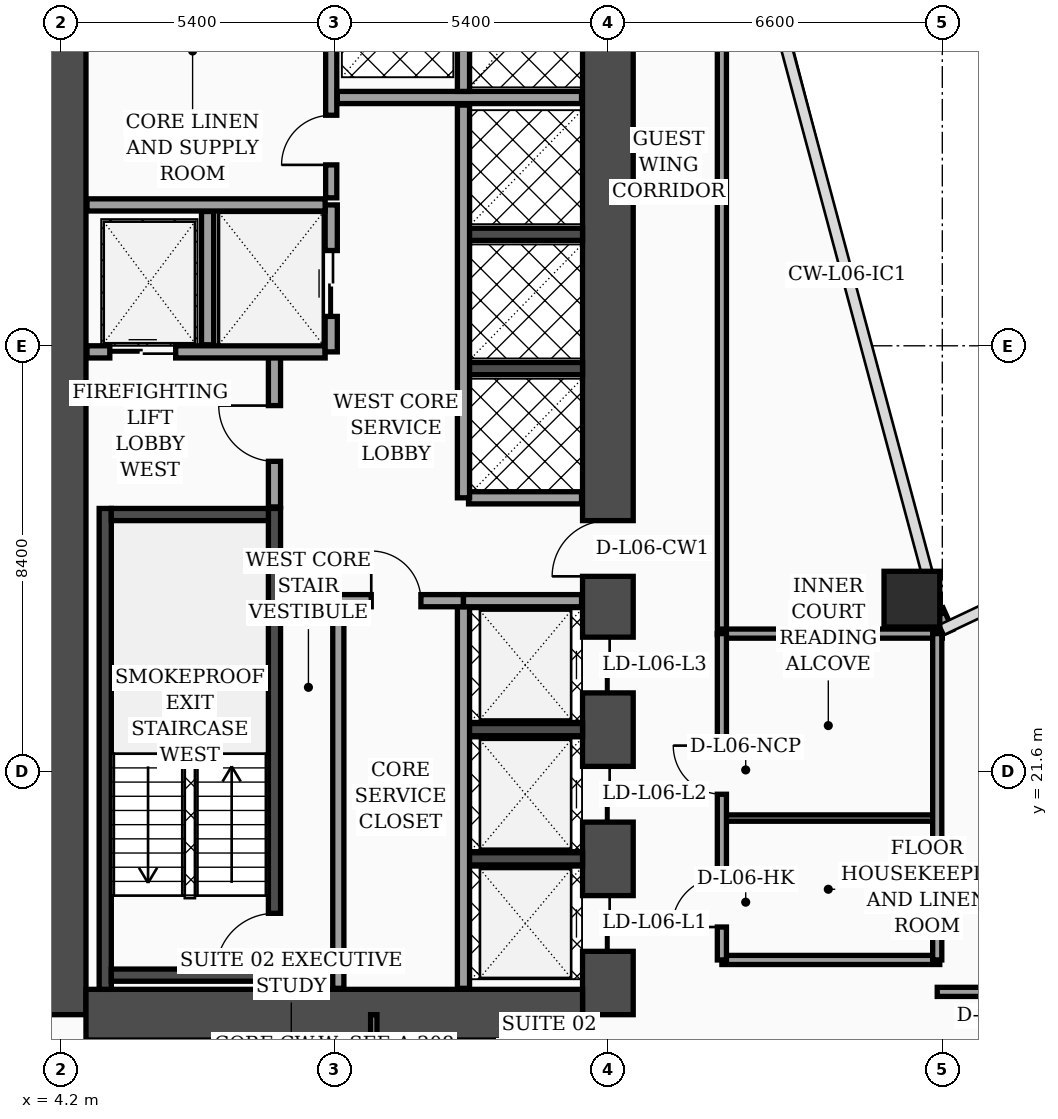
"""IFC4 building model, lengths in metres.
Left out: names, types, materials, properties, quantities, classifications, styles, units other than length and angle.
Written with IfcOpenShell. Run it as: python <this file> out.ifc"""

import sys

from ifc_helpers import new_model, si_unit, direction, frame, frame_2d, origin, origin_2d, place, context, subcontext, project, spatial, rectangle, hollow_rectangle, extrude, element, fill, save


model = new_model("IFC4")
c1 = context("Model", 3, precision=1e-05, world=origin(), true_north=direction((0.0, 1.0)))
c2 = subcontext(c1, "Body", "Model", "MODEL_VIEW")
j1 = project(units=[si_unit("LENGTHUNIT", "METRE"), si_unit("PLANEANGLEUNIT", "RADIAN")], contexts=[c1])
p1 = place(None, origin())
s1 = spatial("IfcSite", under=j1, at=p1, CompositionType="ELEMENT")
p2 = place(p1, origin())
s2 = spatial("IfcBuilding", under=s1, at=p2, CompositionType="ELEMENT")
p3 = place(p2, frame((0.0, 0.0, 30.8)))
s3 = spatial("IfcBuildingStorey", under=s2, at=p3, CompositionType="ELEMENT", Elevation=30.8)
p4 = place(p3, frame((4.2, 16.8, 0.0), z_axis=(0.0, 0.0, 1.0), x_axis=(0.0, 1.0, 0.0)))
e1 = element("IfcWall", 1, at=p4, inside=s3, PredefinedType="SHEAR", context=c2, shape_type="SweptSolid", body=[
    extrude(rectangle(XDim=21.6, YDim=1.0, at=frame_2d((10.8, 0.0))), origin(), (0.0, 0.0, 1.0), 3.56),
])
p5 = place(p3, frame((15.0, 16.8, 0.0), z_axis=(0.0, 0.0, 1.0), x_axis=(0.0, 1.0, 0.0)))
e2 = element("IfcWall", 2, at=p5, inside=s3, PredefinedType="SHEAR", context=c2, shape_type="SweptSolid", body=[
    extrude(rectangle(XDim=21.6, YDim=1.0, at=frame_2d((10.8, 0.0))), origin(), (0.0, 0.0, 1.0), 3.56),
])
p6 = place(p5, frame((8.65, 0.0, 0.0)))
e3 = element("IfcOpeningElement", 3, at=p6, cuts=e2, PredefinedType="OPENING", context=c2, shape_type="SweptSolid", body=[
    extrude(rectangle(XDim=1.1, YDim=2.2, at=frame_2d((0.55, 1.1))), frame((0.0, 0.51, 0.0), z_axis=(0.0, -1.0, 0.0), x_axis=(1.0, 0.0, 0.0)), (0.0, 0.0, 1.0), 1.02),
])
p7 = place(p5, frame((1.25, 0.0, 0.0)))
e4 = element("IfcOpeningElement", 4, at=p7, cuts=e2, PredefinedType="OPENING", context=c2, shape_type="SweptSolid", body=[
    extrude(rectangle(XDim=1.1, YDim=2.2, at=frame_2d((0.55, 1.1))), frame((0.0, 0.51, 0.0), z_axis=(0.0, -1.0, 0.0), x_axis=(1.0, 0.0, 0.0)), (0.0, 0.0, 1.0), 1.02),
])
p8 = place(p5, frame((3.8, 0.0, 0.0)))
e5 = element("IfcOpeningElement", 5, at=p8, cuts=e2, PredefinedType="OPENING", context=c2, shape_type="SweptSolid", body=[
    extrude(rectangle(XDim=1.1, YDim=2.2, at=frame_2d((0.55, 1.1))), frame((0.0, 0.51, 0.0), z_axis=(0.0, -1.0, 0.0), x_axis=(1.0, 0.0, 0.0)), (0.0, 0.0, 1.0), 1.02),
])
p9 = place(p5, frame((6.35, 0.0, 0.0)))
e6 = element("IfcOpeningElement", 6, at=p9, cuts=e2, PredefinedType="OPENING", context=c2, shape_type="SweptSolid", body=[
    extrude(rectangle(XDim=1.1, YDim=2.2, at=frame_2d((0.55, 1.1))), frame((0.0, 0.51, 0.0), z_axis=(0.0, -1.0, 0.0), x_axis=(1.0, 0.0, 0.0)), (0.0, 0.0, 1.0), 1.02),
])
p10 = place(p3, frame((4.7, 16.8, 0.0), z_axis=(0.0, 0.0, 1.0), x_axis=(1.0, 0.0, 0.0)))
e7 = element("IfcWall", 7, at=p10, inside=s3, PredefinedType="SHEAR", context=c2, shape_type="SweptSolid", body=[
    extrude(rectangle(XDim=9.8, YDim=1.0, at=frame_2d((4.9, 0.0))), origin(), (0.0, 0.0, 1.0), 3.56),
])
p11 = place(p3, frame((5.08, 17.3, 0.0), z_axis=(0.0, 0.0, 1.0), x_axis=(0.0, 1.0, 0.0)))
e8 = element("IfcWall", 8, at=p11, inside=s3, PredefinedType="SOLIDWALL", context=c2, shape_type="SweptSolid", body=[
    extrude(rectangle(XDim=9.49, YDim=0.24, at=frame_2d((4.745, 0.0))), origin(), (0.0, 0.0, 1.0), 3.56),
])
p12 = place(p3, frame((8.42, 17.3, 0.0), z_axis=(0.0, 0.0, 1.0), x_axis=(0.0, 1.0, 0.0)))
e9 = element("IfcWall", 9, at=p12, inside=s3, PredefinedType="SOLIDWALL", context=c2, shape_type="SweptSolid", body=[
    extrude(rectangle(XDim=9.49, YDim=0.24, at=frame_2d((4.745, 0.0))), origin(), (0.0, 0.0, 1.0), 3.56),
])
p13 = place(p12, frame((0.35, 0.0, 0.0)))
e10 = element("IfcOpeningElement", 10, at=p13, cuts=e9, PredefinedType="OPENING", context=c2, shape_type="SweptSolid", body=[
    extrude(rectangle(XDim=1.15, YDim=2.2, at=frame_2d((0.575, 1.1))), frame((0.0, 0.13, 0.0), z_axis=(0.0, -1.0, 0.0), x_axis=(1.0, 0.0, 0.0)), (0.0, 0.0, 1.0), 0.26),
])
for number, where, z_axis, x_axis in (
    (11, (5.2, 17.58, 0.0), (0.0, 0.0, 1.0), (1.0, 0.0, 0.0)),
    (12, (5.2, 26.67, 0.0), (0.0, 0.0, 1.0), (1.0, 0.0, 0.0)),
):
    element("IfcWall", number, at=place(p3, frame(where, z_axis=z_axis, x_axis=x_axis)), inside=s3, PredefinedType="SOLIDWALL", context=c2, shape_type="SweptSolid", body=[
        extrude(rectangle(XDim=3.1, YDim=0.24, at=frame_2d((1.55, 0.0))), origin(), (0.0, 0.0, 1.0), 3.56),
    ])
for number, where, z_axis, x_axis in (
    (13, (12.18, 19.875, 0.0), (0.0, 0.0, 1.0), (1.0, 0.0, 0.0)),
    (14, (12.18, 22.425, 0.0), (0.0, 0.0, 1.0), (1.0, 0.0, 0.0)),
    (15, (12.18, 29.55, 0.0), (0.0, 0.0, 1.0), (1.0, 0.0, 0.0)),
    (16, (12.18, 32.2, 0.0), (0.0, 0.0, 1.0), (1.0, 0.0, 0.0)),
):
    element("IfcWall", number, at=place(p3, frame(where, z_axis=z_axis, x_axis=x_axis)), inside=s3, PredefinedType="SOLIDWALL", context=c2, shape_type="SweptSolid", body=[
        extrude(rectangle(XDim=2.32, YDim=0.24, at=frame_2d((1.16, 0.0))), origin(), (0.0, 0.0, 1.0), 3.56),
    ])
p14 = place(p3, frame((21.0, 25.0, 0.0), z_axis=(0.0, 0.0, 1.0), x_axis=(1.0, 0.0, 0.0)))
e17 = element("IfcColumn", 17, at=p14, inside=s3, PredefinedType="COLUMN", context=c2, shape_type="SweptSolid", body=[
    extrude(hollow_rectangle(XDim=1.1, YDim=1.1, WallThickness=0.045, at=origin_2d()), origin(), (0.0, 0.0, 1.0), 3.56),
])
p15 = place(p3, frame((21.68, 24.34, 0.0), z_axis=(0.0, 0.0, 1.0), x_axis=(-0.40758134973, 0.913168901875, 0.0)))
e18 = element("IfcWall", 18, at=p15, inside=s3, PredefinedType="SOLIDWALL", context=c2, shape_type="SweptSolid", body=[
    extrude(rectangle(XDim=0.471, YDim=0.28, at=frame_2d((0.235, 0.0))), origin(), (0.0, 0.0, 1.0), 3.56),
])
p16 = place(p3, frame((8.42, 26.82, 0.0), z_axis=(0.0, 0.0, 1.0), x_axis=(0.0, 1.0, 0.0)))
e19 = element("IfcWall", 19, at=p16, inside=s3, PredefinedType="SOLIDWALL", context=c2, shape_type="SweptSolid", body=[
    extrude(rectangle(XDim=3.0, YDim=0.24, at=frame_2d((1.5, 0.0))), origin(), (0.0, 0.0, 1.0), 3.56),
])
p17 = place(p16, frame((0.9, 0.0, 0.0)))
e20 = element("IfcOpeningElement", 20, at=p17, cuts=e19, PredefinedType="OPENING", context=c2, shape_type="SweptSolid", body=[
    extrude(rectangle(XDim=1.1, YDim=2.2, at=frame_2d((0.55, 1.1))), frame((0.0, 0.13, 0.0), z_axis=(0.0, -1.0, 0.0), x_axis=(1.0, 0.0, 0.0)), (0.0, 0.0, 1.0), 0.26),
])
p18 = place(p3, frame((4.72, 29.88, 0.0), z_axis=(0.0, 0.0, 1.0), x_axis=(1.0, 0.0, 0.0)))
e21 = element("IfcWall", 21, at=p18, inside=s3, PredefinedType="SOLIDWALL", context=c2, shape_type="SweptSolid", body=[
    extrude(rectangle(XDim=4.7, YDim=0.24, at=frame_2d((2.35, 0.0))), origin(), (0.0, 0.0, 1.0), 3.56),
])
p19 = place(p18, frame((0.45, 0.0, 0.0)))
e22 = element("IfcOpeningElement", 22, at=p19, cuts=e21, PredefinedType="OPENING", context=c2, shape_type="SweptSolid", body=[
    extrude(rectangle(XDim=1.3, YDim=2.35, at=frame_2d((0.65, 1.175))), frame((0.0, 0.13, 0.0), z_axis=(0.0, -1.0, 0.0), x_axis=(1.0, 0.0, 0.0)), (0.0, 0.0, 1.0), 0.26),
])
p20 = place(p3, frame((7.1, 30.02, 0.0), z_axis=(0.0, 0.0, 1.0), x_axis=(0.0, 1.0, 0.0)))
e23 = element("IfcWall", 23, at=p20, inside=s3, PredefinedType="SOLIDWALL", context=c2, shape_type="SweptSolid", body=[
    extrude(rectangle(XDim=2.63, YDim=0.24, at=frame_2d((1.315, 0.0))), origin(), (0.0, 0.0, 1.0), 3.56),
])
p21 = place(p3, frame((9.54, 29.88, 0.0), z_axis=(0.0, 0.0, 1.0), x_axis=(0.0, 1.0, 0.0)))
e24 = element("IfcWall", 24, at=p21, inside=s3, PredefinedType="SOLIDWALL", context=c2, shape_type="SweptSolid", body=[
    extrude(rectangle(XDim=2.9, YDim=0.24, at=frame_2d((1.45, 0.0))), origin(), (0.0, 0.0, 1.0), 3.56),
])
p22 = place(p21, frame((0.7, 0.0, 0.0)))
e25 = element("IfcOpeningElement", 25, at=p22, cuts=e24, PredefinedType="OPENING", context=c2, shape_type="SweptSolid", body=[
    extrude(rectangle(XDim=1.3, YDim=2.35, at=frame_2d((0.65, 1.175))), frame((0.0, 0.13, 0.0), z_axis=(0.0, -1.0, 0.0), x_axis=(1.0, 0.0, 0.0)), (0.0, 0.0, 1.0), 0.26),
])
p23 = place(p3, frame((4.72, 32.78, 0.0), z_axis=(0.0, 0.0, 1.0), x_axis=(1.0, 0.0, 0.0)))
e26 = element("IfcWall", 26, at=p23, inside=s3, PredefinedType="SOLIDWALL", context=c2, shape_type="SweptSolid", body=[
    extrude(rectangle(XDim=4.7, YDim=0.24, at=frame_2d((2.35, 0.0))), origin(), (0.0, 0.0, 1.0), 3.56),
])
p24 = place(p3, frame((9.68, 17.32, 0.0), z_axis=(0.0, 0.0, 1.0), x_axis=(0.0, 1.0, 0.0)))
e27 = element("IfcWall", 27, at=p24, inside=s3, PredefinedType="SOLIDWALL", context=c2, shape_type="SweptSolid", body=[
    extrude(rectangle(XDim=7.68, YDim=0.22, at=frame_2d((3.84, 0.0))), origin(), (0.0, 0.0, 1.0), 3.56),
])
p25 = place(p3, frame((9.54, 32.92, 0.0), z_axis=(0.0, 0.0, 1.0), x_axis=(0.0, 1.0, 0.0)))
e28 = element("IfcWall", 28, at=p25, inside=s3, PredefinedType="SOLIDWALL", context=c2, shape_type="SweptSolid", body=[
    extrude(rectangle(XDim=4.96, YDim=0.22, at=frame_2d((2.48, 0.0))), origin(), (0.0, 0.0, 1.0), 3.56),
])
p26 = place(p25, frame((0.65, 0.0, 0.0)))
e29 = element("IfcOpeningElement", 29, at=p26, cuts=e28, PredefinedType="OPENING", context=c2, shape_type="SweptSolid", body=[
    extrude(rectangle(XDim=0.98, YDim=2.15, at=frame_2d((0.49, 1.075))), frame((0.0, 0.12, 0.0), z_axis=(0.0, -1.0, 0.0), x_axis=(1.0, 0.0, 0.0)), (0.0, 0.0, 1.0), 0.24),
])
p27 = place(p3, frame((12.15, 17.32, 0.0), z_axis=(0.0, 0.0, 1.0), x_axis=(0.0, 1.0, 0.0)))
e30 = element("IfcWall", 30, at=p27, inside=s3, PredefinedType="SOLIDWALL", context=c2, shape_type="SweptSolid", body=[
    extrude(rectangle(XDim=7.65, YDim=0.24, at=frame_2d((3.825, 0.0))), origin(), (0.0, 0.0, 1.0), 3.56),
])
p28 = place(p3, frame((9.68, 24.97, 0.0), z_axis=(0.0, 0.0, 1.0), x_axis=(1.0, 0.0, 0.0)))
e31 = element("IfcWall", 31, at=p28, inside=s3, PredefinedType="SOLIDWALL", context=c2, shape_type="SweptSolid", body=[
    extrude(rectangle(XDim=2.47, YDim=0.24, at=frame_2d((1.235, 0.0))), origin(), (0.0, 0.0, 1.0), 3.56),
])
p29 = place(p28, frame((0.65, 0.0, 0.0)))
e32 = element("IfcOpeningElement", 32, at=p29, cuts=e31, PredefinedType="OPENING", context=c2, shape_type="SweptSolid", body=[
    extrude(rectangle(XDim=0.98, YDim=2.15, at=frame_2d((0.49, 1.075))), frame((0.0, 0.13, 0.0), z_axis=(0.0, -1.0, 0.0), x_axis=(1.0, 0.0, 0.0)), (0.0, 0.0, 1.0), 0.26),
])
p30 = place(p3, frame((12.15, 24.97, 0.0), z_axis=(0.0, 0.0, 1.0), x_axis=(1.0, 0.0, 0.0)))
e33 = element("IfcWall", 33, at=p30, inside=s3, PredefinedType="SOLIDWALL", context=c2, shape_type="SweptSolid", body=[
    extrude(rectangle(XDim=2.33, YDim=0.24, at=frame_2d((1.165, 0.0))), origin(), (0.0, 0.0, 1.0), 2.84),
])
p31 = place(p3, frame((12.25, 27.0, 0.0), z_axis=(0.0, 0.0, 1.0), x_axis=(1.0, 0.0, 0.0)))
e34 = element("IfcWall", 34, at=p31, inside=s3, PredefinedType="SOLIDWALL", context=c2, shape_type="SweptSolid", body=[
    extrude(rectangle(XDim=2.23, YDim=0.24, at=frame_2d((1.115, 0.0))), origin(), (0.0, 0.0, 1.0), 3.56),
])
p32 = place(p3, frame((12.15, 27.0, 0.0), z_axis=(0.0, 0.0, 1.0), x_axis=(0.0, 1.0, 0.0)))
e35 = element("IfcWall", 35, at=p32, inside=s3, PredefinedType="SOLIDWALL", context=c2, shape_type="SweptSolid", body=[
    extrude(rectangle(XDim=7.75, YDim=0.24, at=frame_2d((3.875, 0.0))), origin(), (0.0, 0.0, 1.0), 3.56),
])
p33 = place(p3, frame((9.66, 34.9, 0.0), z_axis=(0.0, 0.0, 1.0), x_axis=(1.0, 0.0, 0.0)))
e36 = element("IfcWall", 36, at=p33, inside=s3, PredefinedType="SOLIDWALL", context=c2, shape_type="SweptSolid", body=[
    extrude(rectangle(XDim=4.82, YDim=0.24, at=frame_2d((2.41, 0.0))), origin(), (0.0, 0.0, 1.0), 3.56),
])
p34 = place(p3, frame((12.15, 35.02, 0.0), z_axis=(0.0, 0.0, 1.0), x_axis=(0.0, 1.0, 0.0)))
e37 = element("IfcWall", 37, at=p34, inside=s3, PredefinedType="SOLIDWALL", context=c2, shape_type="SweptSolid", body=[
    extrude(rectangle(XDim=2.86, YDim=0.24, at=frame_2d((1.43, 0.0))), origin(), (0.0, 0.0, 1.0), 3.56),
])
p35 = place(p3, frame((10.38, 14.67, 0.0), z_axis=(0.0, 0.0, 1.0), x_axis=(0.0, 1.0, 0.0)))
e38 = element("IfcWall", 38, at=p35, inside=s3, PredefinedType="PARTITIONING", context=c2, shape_type="SweptSolid", body=[
    extrude(rectangle(XDim=2.13, YDim=0.125, at=frame_2d((1.065, 0.0))), origin(), (0.0, 0.0, 1.0), 3.56),
])
p36 = place(p3, frame((13.3, 2.44, 0.0), z_axis=(0.0, 0.0, 1.0), x_axis=(0.0, 1.0, 0.0)))
e39 = element("IfcWall", 39, at=p36, inside=s3, PredefinedType="PARTITIONING", context=c2, shape_type="SweptSolid", body=[
    extrude(rectangle(XDim=14.36, YDim=0.18, at=frame_2d((7.18, 0.0))), origin(), (0.0, 0.0, 1.0), 3.04),
])
p37 = place(p36, frame((3.01, 0.0, 0.0)))
e40 = element("IfcOpeningElement", 40, at=p37, cuts=e39, PredefinedType="OPENING", context=c2, shape_type="SweptSolid", body=[
    extrude(rectangle(XDim=1.02, YDim=2.2, at=frame_2d((0.51, 1.1))), frame((0.0, 0.1, 0.0), z_axis=(0.0, -1.0, 0.0), x_axis=(1.0, 0.0, 0.0)), (0.0, 0.0, 1.0), 0.2),
])
p38 = place(p36, frame((8.94, 0.0, 0.0)))
e41 = element("IfcOpeningElement", 41, at=p38, cuts=e39, PredefinedType="OPENING", context=c2, shape_type="SweptSolid", body=[
    extrude(rectangle(XDim=1.02, YDim=2.2, at=frame_2d((0.51, 1.1))), frame((0.0, 0.1, 0.0), z_axis=(0.0, -1.0, 0.0), x_axis=(1.0, 0.0, 0.0)), (0.0, 0.0, 1.0), 0.2),
])
p39 = place(p3, frame((17.25, 24.3, 0.0), z_axis=(0.0, 0.0, 1.0), x_axis=(0.0, 1.0, 0.0)))
e42 = element("IfcWall", 42, at=p39, inside=s3, PredefinedType="PARTITIONING", context=c2, shape_type="SweptSolid", body=[
    extrude(rectangle(XDim=16.4, YDim=0.18, at=frame_2d((8.2, 0.0))), origin(), (0.0, 0.0, 1.0), 2.84),
])
p40 = place(p3, frame((17.25, 17.88, 0.0), z_axis=(0.0, 0.0, 1.0), x_axis=(1.0, 0.0, 0.0)))
e43 = element("IfcWall", 43, at=p40, inside=s3, PredefinedType="PARTITIONING", context=c2, shape_type="SweptSolid", body=[
    extrude(rectangle(XDim=4.3, YDim=0.18, at=frame_2d((2.15, 0.0))), origin(), (0.0, 0.0, 1.0), 3.09),
])
p41 = place(p3, frame((17.25, 20.68, 0.0), z_axis=(0.0, 0.0, 1.0), x_axis=(1.0, 0.0, 0.0)))
e44 = element("IfcWall", 44, at=p41, inside=s3, PredefinedType="PARTITIONING", context=c2, shape_type="SweptSolid", body=[
    extrude(rectangle(XDim=4.3, YDim=0.125, at=frame_2d((2.15, 0.0))), origin(), (0.0, 0.0, 1.0), 3.56),
])
p42 = place(p3, frame((17.25, 24.32, 0.0), z_axis=(0.0, 0.0, 1.0), x_axis=(1.0, 0.0, 0.0)))
e45 = element("IfcWall", 45, at=p42, inside=s3, PredefinedType="PARTITIONING", context=c2, shape_type="SweptSolid", body=[
    extrude(rectangle(XDim=4.35, YDim=0.18, at=frame_2d((2.175, 0.0))), origin(), (0.0, 0.0, 1.0), 3.56),
])
p43 = place(p3, frame((21.5, 17.88, 0.0), z_axis=(0.0, 0.0, 1.0), x_axis=(0.0, 1.0, 0.0)))
e46 = element("IfcWall", 46, at=p43, inside=s3, PredefinedType="PARTITIONING", context=c2, shape_type="SweptSolid", body=[
    extrude(rectangle(XDim=6.44, YDim=0.18, at=frame_2d((3.22, 0.0))), origin(), (0.0, 0.0, 1.0), 3.09),
])
p44 = place(p3, frame((17.25, 17.88, 0.0), z_axis=(0.0, 0.0, 1.0), x_axis=(0.0, 1.0, 0.0)))
e47 = element("IfcWall", 47, at=p44, inside=s3, PredefinedType="PARTITIONING", context=c2, shape_type="SweptSolid", body=[
    extrude(rectangle(XDim=6.44, YDim=0.18, at=frame_2d((3.22, 0.0))), origin(), (0.0, 0.0, 1.0), 3.09),
])
p45 = place(p44, frame((0.65, 0.0, 0.0)))
e48 = element("IfcOpeningElement", 48, at=p45, cuts=e47, PredefinedType="OPENING", context=c2, shape_type="SweptSolid", body=[
    extrude(rectangle(XDim=0.98, YDim=2.15, at=frame_2d((0.49, 1.075))), frame((0.0, 0.1, 0.0), z_axis=(0.0, -1.0, 0.0), x_axis=(1.0, 0.0, 0.0)), (0.0, 0.0, 1.0), 0.2),
])
p46 = place(p44, frame((3.27, 0.0, 0.0)))
e49 = element("IfcOpeningElement", 49, at=p46, cuts=e47, PredefinedType="OPENING", context=c2, shape_type="SweptSolid", body=[
    extrude(rectangle(XDim=0.96, YDim=2.2, at=frame_2d((0.48, 1.1))), frame((0.0, 0.1, 0.0), z_axis=(0.0, -1.0, 0.0), x_axis=(1.0, 0.0, 0.0)), (0.0, 0.0, 1.0), 0.2),
])
p47 = place(p3, frame((21.5, 17.25, 0.0), z_axis=(0.0, 0.0, 1.0), x_axis=(1.0, 0.0, 0.0)))
e50 = element("IfcWall", 50, at=p47, inside=s3, PredefinedType="PARTITIONING", context=c2, shape_type="SweptSolid", body=[
    extrude(rectangle(XDim=28.65, YDim=0.18, at=frame_2d((14.325, 0.0))), origin(), (0.0, 0.0, 1.0), 2.84),
])
p48 = place(p47, frame((0.95, 0.0, 0.0)))
e51 = element("IfcOpeningElement", 51, at=p48, cuts=e50, PredefinedType="OPENING", context=c2, shape_type="SweptSolid", body=[
    extrude(rectangle(XDim=1.02, YDim=2.2, at=frame_2d((0.51, 1.1))), frame((0.0, 0.1, 0.0), z_axis=(0.0, -1.0, 0.0), x_axis=(1.0, 0.0, 0.0)), (0.0, 0.0, 1.0), 0.2),
])
p49 = place(p47, frame((15.23, 0.0, 0.0)))
e52 = element("IfcOpeningElement", 52, at=p49, cuts=e50, PredefinedType="OPENING", context=c2, shape_type="SweptSolid", body=[
    extrude(rectangle(XDim=1.02, YDim=2.2, at=frame_2d((0.51, 1.1))), frame((0.0, 0.1, 0.0), z_axis=(0.0, -1.0, 0.0), x_axis=(1.0, 0.0, 0.0)), (0.0, 0.0, 1.0), 0.2),
])
p50 = place(p17, origin())
e53 = element("IfcDoor", 53, at=p50, inside=s3, OperationType="SINGLE_SWING_RIGHT", PredefinedType="DOOR", context=c2, shape_type="SweptSolid", body=[
    extrude(rectangle(XDim=1.1, YDim=2.2, at=frame_2d((0.55, 1.1))), frame((0.0, 0.025, 0.0), z_axis=(0.0, -1.0, 0.0), x_axis=(1.0, 0.0, 0.0)), (0.0, 0.0, 1.0), 0.05),
])
fill(e20, e53)
p51 = place(p19, origin())
e54 = element("IfcDoor", 54, at=p51, inside=s3, OperationType="DOUBLE_DOOR_SLIDING", PredefinedType="DOOR", context=c2, shape_type="SweptSolid", body=[
    extrude(rectangle(XDim=1.3, YDim=2.35, at=frame_2d((0.65, 1.175))), frame((0.0, 0.025, 0.0), z_axis=(0.0, -1.0, 0.0), x_axis=(1.0, 0.0, 0.0)), (0.0, 0.0, 1.0), 0.05),
])
fill(e22, e54)
p52 = place(p22, origin())
e55 = element("IfcDoor", 55, at=p52, inside=s3, OperationType="DOUBLE_DOOR_SLIDING", PredefinedType="DOOR", context=c2, shape_type="SweptSolid", body=[
    extrude(rectangle(XDim=1.3, YDim=2.35, at=frame_2d((0.65, 1.175))), frame((0.0, 0.025, 0.0), z_axis=(0.0, -1.0, 0.0), x_axis=(1.0, 0.0, 0.0)), (0.0, 0.0, 1.0), 0.05),
])
fill(e25, e55)
p53 = place(p26, origin())
e56 = element("IfcDoor", 56, at=p53, inside=s3, OperationType="SINGLE_SWING_LEFT", PredefinedType="DOOR", context=c2, shape_type="SweptSolid", body=[
    extrude(rectangle(XDim=0.98, YDim=2.15, at=frame_2d((0.49, 1.075))), frame((0.0, 0.025, 0.0), z_axis=(0.0, -1.0, 0.0), x_axis=(1.0, 0.0, 0.0)), (0.0, 0.0, 1.0), 0.05),
])
fill(e29, e56)
p54 = place(p29, origin())
e57 = element("IfcDoor", 57, at=p54, inside=s3, OperationType="SINGLE_SWING_LEFT", PredefinedType="DOOR", context=c2, shape_type="SweptSolid", body=[
    extrude(rectangle(XDim=0.98, YDim=2.15, at=frame_2d((0.49, 1.075))), frame((0.0, 0.025, 0.0), z_axis=(0.0, -1.0, 0.0), x_axis=(1.0, 0.0, 0.0)), (0.0, 0.0, 1.0), 0.05),
])
fill(e32, e57)
p55 = place(p45, origin())
e58 = element("IfcDoor", 58, at=p55, inside=s3, OperationType="SINGLE_SWING_LEFT", PredefinedType="DOOR", context=c2, shape_type="SweptSolid", body=[
    extrude(rectangle(XDim=0.98, YDim=2.15, at=frame_2d((0.49, 1.075))), frame((0.0, 0.025, 0.0), z_axis=(0.0, -1.0, 0.0), x_axis=(1.0, 0.0, 0.0)), (0.0, 0.0, 1.0), 0.05),
])
fill(e48, e58)
p56 = place(p46, origin())
e59 = element("IfcDoor", 59, at=p56, inside=s3, OperationType="SINGLE_SWING_RIGHT", PredefinedType="DOOR", context=c2, shape_type="SweptSolid", body=[
    extrude(rectangle(XDim=0.96, YDim=2.2, at=frame_2d((0.48, 1.1))), frame((0.0, 0.025, 0.0), z_axis=(0.0, -1.0, 0.0), x_axis=(1.0, 0.0, 0.0)), (0.0, 0.0, 1.0), 0.05),
])
fill(e49, e59)
p57 = place(p13, origin())
e60 = element("IfcDoor", 60, at=p57, inside=s3, OperationType="SINGLE_SWING_LEFT", PredefinedType="DOOR", context=c2, shape_type="SweptSolid", body=[
    extrude(rectangle(XDim=1.15, YDim=2.2, at=frame_2d((0.575, 1.1))), frame((0.0, 0.025, 0.0), z_axis=(0.0, -1.0, 0.0), x_axis=(1.0, 0.0, 0.0)), (0.0, 0.0, 1.0), 0.05),
])
fill(e10, e60)
p58 = place(p6, origin())
e61 = element("IfcDoor", 61, at=p58, inside=s3, OperationType="SINGLE_SWING_LEFT", PredefinedType="DOOR", context=c2, shape_type="SweptSolid", body=[
    extrude(rectangle(XDim=1.1, YDim=2.2, at=frame_2d((0.55, 1.1))), frame((0.0, 0.025, 0.0), z_axis=(0.0, -1.0, 0.0), x_axis=(1.0, 0.0, 0.0)), (0.0, 0.0, 1.0), 0.05),
])
fill(e3, e61)
p59 = place(p7, origin())
e62 = element("IfcDoor", 62, at=p59, inside=s3, OperationType="DOUBLE_DOOR_SLIDING", PredefinedType="DOOR", context=c2, shape_type="SweptSolid", body=[
    extrude(rectangle(XDim=1.1, YDim=2.2, at=frame_2d((0.55, 1.1))), frame((0.0, 0.025, 0.0), z_axis=(0.0, -1.0, 0.0), x_axis=(1.0, 0.0, 0.0)), (0.0, 0.0, 1.0), 0.05),
])
fill(e4, e62)
p60 = place(p8, origin())
e63 = element("IfcDoor", 63, at=p60, inside=s3, OperationType="DOUBLE_DOOR_SLIDING", PredefinedType="DOOR", context=c2, shape_type="SweptSolid", body=[
    extrude(rectangle(XDim=1.1, YDim=2.2, at=frame_2d((0.55, 1.1))), frame((0.0, 0.025, 0.0), z_axis=(0.0, -1.0, 0.0), x_axis=(1.0, 0.0, 0.0)), (0.0, 0.0, 1.0), 0.05),
])
fill(e5, e63)
p61 = place(p9, origin())
e64 = element("IfcDoor", 64, at=p61, inside=s3, OperationType="DOUBLE_DOOR_SLIDING", PredefinedType="DOOR", context=c2, shape_type="SweptSolid", body=[
    extrude(rectangle(XDim=1.1, YDim=2.2, at=frame_2d((0.55, 1.1))), frame((0.0, 0.025, 0.0), z_axis=(0.0, -1.0, 0.0), x_axis=(1.0, 0.0, 0.0)), (0.0, 0.0, 1.0), 0.05),
])
fill(e6, e64)
save(model, sys.argv[1])
